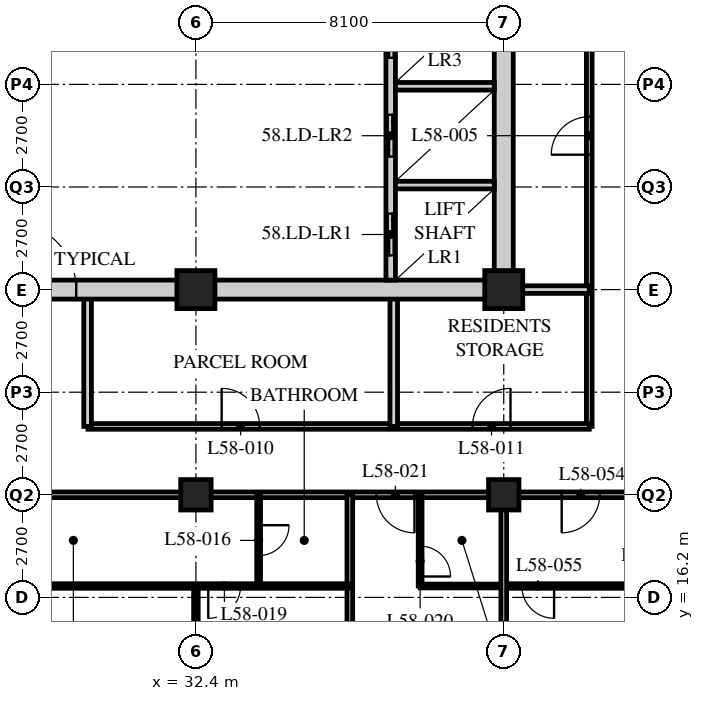
"""IFC4 building model, lengths in metres.
Left out: names, types, materials, properties, quantities, classifications, styles, units other than length and angle.
Written with IfcOpenShell. Run it as: python <this file> out.ifc"""

import sys

from ifc_helpers import new_model, si_unit, direction, frame, frame_2d, origin, origin_2d, place, context, subcontext, project, spatial, rectangle, hollow_rectangle, extrude, element, fill, save


model = new_model("IFC4")
c1 = context("Model", 3, precision=1e-05, world=origin(), true_north=direction((0.0, 1.0)))
c2 = subcontext(c1, "Body", "Model", "MODEL_VIEW")
j1 = project(units=[si_unit("LENGTHUNIT", "METRE"), si_unit("PLANEANGLEUNIT", "RADIAN")], contexts=[c1])
p1 = place(None, origin())
s1 = spatial("IfcSite", under=j1, at=p1, CompositionType="ELEMENT")
p2 = place(p1, origin())
s2 = spatial("IfcBuilding", under=s1, at=p2, CompositionType="ELEMENT")
p3 = place(p2, frame((0.0, 0.0, 224.4)))
s3 = spatial("IfcBuildingStorey", under=s2, at=p3, CompositionType="ELEMENT", Elevation=224.4)
p4 = place(p3, frame((32.4, 18.9, 0.0), z_axis=(0.0, 0.0, 1.0), x_axis=(1.0, 0.0, 0.0)))
e1 = element("IfcColumn", 1, at=p4, inside=s3, PredefinedType="COLUMN", context=c2, shape_type="SweptSolid", body=[
    extrude(hollow_rectangle(XDim=0.8, YDim=0.8, WallThickness=0.08, at=origin_2d()), origin(), (0.0, 0.0, 1.0), 3.6),
])
p5 = place(p3, frame((32.4, 24.3, 0.0), z_axis=(0.0, 0.0, 1.0), x_axis=(1.0, 0.0, 0.0)))
e2 = element("IfcColumn", 2, at=p5, inside=s3, PredefinedType="COLUMN", context=c2, shape_type="SweptSolid", body=[
    extrude(hollow_rectangle(XDim=1.0, YDim=1.0, WallThickness=0.1, at=origin_2d()), origin(), (0.0, 0.0, 1.0), 3.6),
])
p6 = place(p3, frame((40.5, 18.9, 0.0), z_axis=(0.0, 0.0, 1.0), x_axis=(1.0, 0.0, 0.0)))
e3 = element("IfcColumn", 3, at=p6, inside=s3, PredefinedType="COLUMN", context=c2, shape_type="SweptSolid", body=[
    extrude(hollow_rectangle(XDim=0.8, YDim=0.8, WallThickness=0.08, at=origin_2d()), origin(), (0.0, 0.0, 1.0), 3.6),
])
p7 = place(p3, frame((40.5, 24.3, 0.0), z_axis=(0.0, 0.0, 1.0), x_axis=(1.0, 0.0, 0.0)))
e4 = element("IfcColumn", 4, at=p7, inside=s3, PredefinedType="COLUMN", context=c2, shape_type="SweptSolid", body=[
    extrude(hollow_rectangle(XDim=1.0, YDim=1.0, WallThickness=0.1, at=origin_2d()), origin(), (0.0, 0.0, 1.0), 3.6),
])
p8 = place(p3, frame((8.1, 18.9, 0.0), z_axis=(0.0, 0.0, 1.0), x_axis=(1.0, 0.0, 0.0)))
e5 = element("IfcWall", 5, at=p8, inside=s3, PredefinedType="PARTITIONING", context=c2, shape_type="SweptSolid", body=[
    extrude(rectangle(XDim=36.45, YDim=0.15, at=frame_2d((18.225, 0.0))), origin(), (0.0, 0.0, 1.0), 2.628),
])
p9 = place(p8, frame((4.45, 0.0, 0.0)))
e6 = element("IfcOpeningElement", 6, at=p9, cuts=e5, PredefinedType="OPENING", context=c2, shape_type="SweptSolid", body=[
    extrude(rectangle(XDim=1.0, YDim=2.1, at=frame_2d((0.5, 1.05))), frame((0.0, 0.085, 0.0), z_axis=(0.0, -1.0, 0.0), x_axis=(1.0, 0.0, 0.0)), (0.0, 0.0, 1.0), 0.17),
])
p10 = place(p8, frame((17.1, 0.0, 0.0)))
e7 = element("IfcOpeningElement", 7, at=p10, cuts=e5, PredefinedType="OPENING", context=c2, shape_type="SweptSolid", body=[
    extrude(rectangle(XDim=1.0, YDim=2.1, at=frame_2d((0.5, 1.05))), frame((0.0, 0.085, 0.0), z_axis=(0.0, -1.0, 0.0), x_axis=(1.0, 0.0, 0.0)), (0.0, 0.0, 1.0), 0.17),
])
p11 = place(p8, frame((29.05, 0.0, 0.0)))
e8 = element("IfcOpeningElement", 8, at=p11, cuts=e5, PredefinedType="OPENING", context=c2, shape_type="SweptSolid", body=[
    extrude(rectangle(XDim=1.0, YDim=2.1, at=frame_2d((0.5, 1.05))), frame((0.0, 0.085, 0.0), z_axis=(0.0, -1.0, 0.0), x_axis=(1.0, 0.0, 0.0)), (0.0, 0.0, 1.0), 0.17),
])
p12 = place(p8, frame((2.625, 0.0, 0.0)))
e9 = element("IfcOpeningElement", 9, at=p12, cuts=e5, PredefinedType="OPENING", context=c2, shape_type="SweptSolid", body=[
    extrude(rectangle(XDim=1.0, YDim=2.1, at=frame_2d((0.5, 1.05))), frame((0.0, 0.085, 0.0), z_axis=(0.0, -1.0, 0.0), x_axis=(1.0, 0.0, 0.0)), (0.0, 0.0, 1.0), 0.17),
])
p13 = place(p8, frame((33.925, 0.0, 0.0)))
e10 = element("IfcOpeningElement", 10, at=p13, cuts=e5, PredefinedType="OPENING", context=c2, shape_type="SweptSolid", body=[
    extrude(rectangle(XDim=1.0, YDim=2.1, at=frame_2d((0.5, 1.05))), frame((0.0, 0.085, 0.0), z_axis=(0.0, -1.0, 0.0), x_axis=(1.0, 0.0, 0.0)), (0.0, 0.0, 1.0), 0.17),
])
p14 = place(p3, frame((42.75, 20.7, 0.0), z_axis=(0.0, 0.0, 1.0), x_axis=(0.0, 1.0, 0.0)))
e11 = element("IfcWall", 11, at=p14, inside=s3, PredefinedType="PARTITIONING", context=c2, shape_type="SweptSolid", body=[
    extrude(rectangle(XDim=19.8, YDim=0.15, at=frame_2d((9.9, 0.0))), origin(), (0.0, 0.0, 1.0), 3.39),
])
p15 = place(p14, frame((7.15, 0.0, 0.0)))
e12 = element("IfcOpeningElement", 12, at=p15, cuts=e11, PredefinedType="OPENING", context=c2, shape_type="SweptSolid", body=[
    extrude(rectangle(XDim=1.0, YDim=2.1, at=frame_2d((0.5, 1.05))), frame((0.0, 0.085, 0.0), z_axis=(0.0, -1.0, 0.0), x_axis=(1.0, 0.0, 0.0)), (0.0, 0.0, 1.0), 0.17),
])
p16 = place(p14, frame((15.25, 0.0, 0.0)))
e13 = element("IfcOpeningElement", 13, at=p16, cuts=e11, PredefinedType="OPENING", context=c2, shape_type="SweptSolid", body=[
    extrude(rectangle(XDim=1.0, YDim=2.1, at=frame_2d((0.5, 1.05))), frame((0.0, 0.085, 0.0), z_axis=(0.0, -1.0, 0.0), x_axis=(1.0, 0.0, 0.0)), (0.0, 0.0, 1.0), 0.17),
])
p17 = place(p3, frame((29.56, 20.7, 0.0), z_axis=(0.0, 0.0, 1.0), x_axis=(1.0, 0.0, 0.0)))
e14 = element("IfcWall", 14, at=p17, inside=s3, PredefinedType="PARTITIONING", context=c2, shape_type="SweptSolid", body=[
    extrude(rectangle(XDim=13.19, YDim=0.15, at=frame_2d((6.595, 0.0))), origin(), (0.0, 0.0, 1.0), 3.39),
])
p18 = place(p17, frame((3.518, 0.0, 0.0)))
e15 = element("IfcOpeningElement", 15, at=p18, cuts=e14, PredefinedType="OPENING", context=c2, shape_type="SweptSolid", body=[
    extrude(rectangle(XDim=1.0, YDim=2.1, at=frame_2d((0.5, 1.05))), frame((0.0, 0.085, 0.0), z_axis=(0.0, -1.0, 0.0), x_axis=(1.0, 0.0, 0.0)), (0.0, 0.0, 1.0), 0.17),
])
p19 = place(p17, frame((10.118, 0.0, 0.0)))
e16 = element("IfcOpeningElement", 16, at=p19, cuts=e14, PredefinedType="OPENING", context=c2, shape_type="SweptSolid", body=[
    extrude(rectangle(XDim=1.0, YDim=2.1, at=frame_2d((0.5, 1.05))), frame((0.0, 0.085, 0.0), z_axis=(0.0, -1.0, 0.0), x_axis=(1.0, 0.0, 0.0)), (0.0, 0.0, 1.0), 0.17),
])
for number, where, z_axis, x_axis in (
    (17, (37.606, 20.7, 0.0), (0.0, 0.0, 1.0), (0.0, 1.0, 0.0)),
    (18, (29.55, 20.7, 0.0), (0.0, 0.0, 1.0), (0.0, 1.0, 0.0)),
):
    element("IfcWall", number, at=place(p3, frame(where, z_axis=z_axis, x_axis=x_axis)), inside=s3, PredefinedType="SOLIDWALL", context=c2, shape_type="SweptSolid", body=[
        extrude(rectangle(XDim=3.6, YDim=0.2, at=frame_2d((1.8, 0.0))), origin(), (0.0, 0.0, 1.0), 3.39),
    ])
p20 = place(p3, frame((40.5, 24.3, 0.0), z_axis=(0.0, 0.0, 1.0), x_axis=(1.0, 0.0, 0.0)))
e19 = element("IfcWall", 19, at=p20, inside=s3, PredefinedType="SOLIDWALL", context=c2, shape_type="SweptSolid", body=[
    extrude(rectangle(XDim=2.25, YDim=0.2, at=frame_2d((1.125, 0.0))), origin(), (0.0, 0.0, 1.0), 3.39),
])
p21 = place(p3, frame((34.05, 18.9, 0.0), z_axis=(0.0, 0.0, 1.0), x_axis=(0.0, -1.0, 0.0)))
e20 = element("IfcWall", 20, at=p21, inside=s3, PredefinedType="PARTITIONING", context=c2, shape_type="SweptSolid", body=[
    extrude(rectangle(XDim=2.4, YDim=0.1, at=frame_2d((1.2, 0.0))), origin(), (0.0, 0.0, 1.0), 3.39),
])
p22 = place(p21, frame((0.8, 0.0, 0.0)))
e21 = element("IfcOpeningElement", 21, at=p22, cuts=e20, PredefinedType="OPENING", context=c2, shape_type="SweptSolid", body=[
    extrude(rectangle(XDim=0.8, YDim=2.1, at=frame_2d((0.4, 1.05))), frame((0.0, 0.06, 0.0), z_axis=(0.0, -1.0, 0.0), x_axis=(1.0, 0.0, 0.0)), (0.0, 0.0, 1.0), 0.12),
])
p23 = place(p3, frame((32.4, 16.5, 0.0), z_axis=(0.0, 0.0, 1.0), x_axis=(0.0, -1.0, 0.0)))
e22 = element("IfcWall", 22, at=p23, inside=s3, PredefinedType="PARTITIONING", context=c2, shape_type="SweptSolid", body=[
    extrude(rectangle(XDim=5.4, YDim=0.12, at=frame_2d((2.7, 0.0))), origin(), (0.0, 0.0, 1.0), 2.628),
])
p24 = place(p3, frame((36.45, 18.9, 0.0), z_axis=(0.0, 0.0, 1.0), x_axis=(0.0, -1.0, 0.0)))
e23 = element("IfcWall", 23, at=p24, inside=s3, PredefinedType="PARTITIONING", context=c2, shape_type="SweptSolid", body=[
    extrude(rectangle(XDim=7.8, YDim=0.15, at=frame_2d((3.9, 0.0))), origin(), (0.0, 0.0, 1.0), 3.39),
])
p25 = place(p3, frame((38.3, 16.5, 0.0), z_axis=(0.0, 0.0, 1.0), x_axis=(1.0, 0.0, 0.0)))
e24 = element("IfcWall", 24, at=p25, inside=s3, PredefinedType="PARTITIONING", context=c2, shape_type="SweptSolid", body=[
    extrude(rectangle(XDim=2.2, YDim=0.1, at=frame_2d((1.1, 0.0))), origin(), (0.0, 0.0, 1.0), 3.39),
])
p26 = place(p3, frame((38.3, 18.9, 0.0), z_axis=(0.0, 0.0, 1.0), x_axis=(0.0, -1.0, 0.0)))
e25 = element("IfcWall", 25, at=p26, inside=s3, PredefinedType="PARTITIONING", context=c2, shape_type="SweptSolid", body=[
    extrude(rectangle(XDim=2.4, YDim=0.1, at=frame_2d((1.2, 0.0))), origin(), (0.0, 0.0, 1.0), 3.39),
])
p27 = place(p26, frame((1.35, 0.0, 0.0)))
e26 = element("IfcOpeningElement", 26, at=p27, cuts=e25, PredefinedType="OPENING", context=c2, shape_type="SweptSolid", body=[
    extrude(rectangle(XDim=0.8, YDim=2.1, at=frame_2d((0.4, 1.05))), frame((0.0, 0.06, 0.0), z_axis=(0.0, -1.0, 0.0), x_axis=(1.0, 0.0, 0.0)), (0.0, 0.0, 1.0), 0.12),
])
p28 = place(p3, frame((8.1, 16.5, 0.0), z_axis=(0.0, 0.0, 1.0), x_axis=(1.0, 0.0, 0.0)))
e27 = element("IfcWall", 27, at=p28, inside=s3, PredefinedType="PARTITIONING", context=c2, shape_type="SweptSolid", body=[
    extrude(rectangle(XDim=28.35, YDim=0.12, at=frame_2d((14.175, 0.0))), origin(), (0.0, 0.0, 1.0), 3.39),
])
p29 = place(p28, frame((5.025, 0.0, 0.0)))
e28 = element("IfcOpeningElement", 28, at=p29, cuts=e27, PredefinedType="OPENING", context=c2, shape_type="SweptSolid", body=[
    extrude(rectangle(XDim=0.85, YDim=2.1, at=frame_2d((0.425, 1.05))), frame((0.0, 0.07, 0.0), z_axis=(0.0, -1.0, 0.0), x_axis=(1.0, 0.0, 0.0)), (0.0, 0.0, 1.0), 0.14),
])
p30 = place(p28, frame((12.475, 0.0, 0.0)))
e29 = element("IfcOpeningElement", 29, at=p30, cuts=e27, PredefinedType="OPENING", context=c2, shape_type="SweptSolid", body=[
    extrude(rectangle(XDim=0.85, YDim=2.1, at=frame_2d((0.425, 1.05))), frame((0.0, 0.07, 0.0), z_axis=(0.0, -1.0, 0.0), x_axis=(1.0, 0.0, 0.0)), (0.0, 0.0, 1.0), 0.14),
])
p31 = place(p28, frame((17.175, 0.0, 0.0)))
e30 = element("IfcOpeningElement", 30, at=p31, cuts=e27, PredefinedType="OPENING", context=c2, shape_type="SweptSolid", body=[
    extrude(rectangle(XDim=0.85, YDim=2.1, at=frame_2d((0.425, 1.05))), frame((0.0, 0.07, 0.0), z_axis=(0.0, -1.0, 0.0), x_axis=(1.0, 0.0, 0.0)), (0.0, 0.0, 1.0), 0.14),
])
p32 = place(p28, frame((24.625, 0.0, 0.0)))
e31 = element("IfcOpeningElement", 31, at=p32, cuts=e27, PredefinedType="OPENING", context=c2, shape_type="SweptSolid", body=[
    extrude(rectangle(XDim=0.85, YDim=2.1, at=frame_2d((0.425, 1.05))), frame((0.0, 0.07, 0.0), z_axis=(0.0, -1.0, 0.0), x_axis=(1.0, 0.0, 0.0)), (0.0, 0.0, 1.0), 0.14),
])
p33 = place(p28, frame((2.725, 0.0, 0.0)))
e32 = element("IfcOpeningElement", 32, at=p33, cuts=e27, PredefinedType="OPENING", context=c2, shape_type="SweptSolid", body=[
    extrude(rectangle(XDim=0.85, YDim=2.1, at=frame_2d((0.425, 1.05))), frame((0.0, 0.07, 0.0), z_axis=(0.0, -1.0, 0.0), x_axis=(1.0, 0.0, 0.0)), (0.0, 0.0, 1.0), 0.14),
])
p34 = place(p3, frame((40.5, 16.5, 0.0), z_axis=(0.0, 0.0, 1.0), x_axis=(1.0, 0.0, 0.0)))
e33 = element("IfcWall", 33, at=p34, inside=s3, PredefinedType="PARTITIONING", context=c2, shape_type="SweptSolid", body=[
    extrude(rectangle(XDim=8.05, YDim=0.12, at=frame_2d((4.025, 0.0))), origin(), (0.0, 0.0, 1.0), 3.39),
])
p35 = place(p34, frame((0.475, 0.0, 0.0)))
e34 = element("IfcOpeningElement", 34, at=p35, cuts=e33, PredefinedType="OPENING", context=c2, shape_type="SweptSolid", body=[
    extrude(rectangle(XDim=0.85, YDim=2.1, at=frame_2d((0.425, 1.05))), frame((0.0, 0.07, 0.0), z_axis=(0.0, -1.0, 0.0), x_axis=(1.0, 0.0, 0.0)), (0.0, 0.0, 1.0), 0.14),
])
p36 = place(p34, frame((4.325, 0.0, 0.0)))
e35 = element("IfcOpeningElement", 35, at=p36, cuts=e33, PredefinedType="OPENING", context=c2, shape_type="SweptSolid", body=[
    extrude(rectangle(XDim=0.85, YDim=2.1, at=frame_2d((0.425, 1.05))), frame((0.0, 0.07, 0.0), z_axis=(0.0, -1.0, 0.0), x_axis=(1.0, 0.0, 0.0)), (0.0, 0.0, 1.0), 0.14),
])
p37 = place(p3, frame((40.5, 18.9, 0.0), z_axis=(0.0, 0.0, 1.0), x_axis=(0.0, -1.0, 0.0)))
e36 = element("IfcWall", 36, at=p37, inside=s3, PredefinedType="PARTITIONING", context=c2, shape_type="SweptSolid", body=[
    extrude(rectangle(XDim=7.8, YDim=0.15, at=frame_2d((3.9, 0.0))), origin(), (0.0, 0.0, 1.0), 2.628),
])
p38 = place(p3, frame((15.95, 24.3, 0.0), z_axis=(0.0, 0.0, 1.0), x_axis=(1.0, 0.0, 0.0)))
e37 = element("IfcWall", 37, at=p38, inside=s3, PredefinedType="SOLIDWALL", context=c2, shape_type="SweptSolid", body=[
    extrude(rectangle(XDim=24.8, YDim=0.5, at=frame_2d((12.4, 0.0))), origin(), (0.0, 0.0, 1.0), 2.628),
])
p39 = place(p38, frame((11.5, 0.0, 0.0)))
e38 = element("IfcOpeningElement", 38, at=p39, cuts=e37, PredefinedType="OPENING", context=c2, shape_type="SweptSolid", body=[
    extrude(rectangle(XDim=1.8, YDim=2.4, at=frame_2d((0.9, 1.2))), frame((0.0, 0.26, 0.0), z_axis=(0.0, -1.0, 0.0), x_axis=(1.0, 0.0, 0.0)), (0.0, 0.0, 1.0), 0.52),
])
p40 = place(p3, frame((40.5, 24.55, 0.0), z_axis=(0.0, 0.0, 1.0), x_axis=(0.0, 1.0, 0.0)))
e39 = element("IfcWall", 39, at=p40, inside=s3, PredefinedType="SOLIDWALL", context=c2, shape_type="SweptSolid", body=[
    extrude(rectangle(XDim=15.7, YDim=0.5, at=frame_2d((7.85, 0.0))), origin(), (0.0, 0.0, 1.0), 2.628),
])
p41 = place(p3, frame((37.525, 24.55, 0.0), z_axis=(0.0, 0.0, 1.0), x_axis=(0.0, 1.0, 0.0)))
e40 = element("IfcWall", 40, at=p41, inside=s3, PredefinedType="SOLIDWALL", context=c2, shape_type="SweptSolid", body=[
    extrude(rectangle(XDim=7.75, YDim=0.25, at=frame_2d((3.875, 0.0))), origin(), (0.0, 0.0, 1.0), 3.39),
])
p42 = place(p41, frame((0.65, 0.0, 0.0)))
e41 = element("IfcOpeningElement", 41, at=p42, cuts=e40, PredefinedType="OPENING", context=c2, shape_type="SweptSolid", body=[
    extrude(rectangle(XDim=1.1, YDim=2.4, at=frame_2d((0.55, 1.2))), frame((0.0, 0.135, 0.0), z_axis=(0.0, -1.0, 0.0), x_axis=(1.0, 0.0, 0.0)), (0.0, 0.0, 1.0), 0.27),
])
p43 = place(p41, frame((3.25, 0.0, 0.0)))
e42 = element("IfcOpeningElement", 42, at=p43, cuts=e40, PredefinedType="OPENING", context=c2, shape_type="SweptSolid", body=[
    extrude(rectangle(XDim=1.1, YDim=2.4, at=frame_2d((0.55, 1.2))), frame((0.0, 0.135, 0.0), z_axis=(0.0, -1.0, 0.0), x_axis=(1.0, 0.0, 0.0)), (0.0, 0.0, 1.0), 0.27),
])
p44 = place(p41, frame((5.85, 0.0, 0.0)))
e43 = element("IfcOpeningElement", 43, at=p44, cuts=e40, PredefinedType="OPENING", context=c2, shape_type="SweptSolid", body=[
    extrude(rectangle(XDim=1.1, YDim=2.4, at=frame_2d((0.55, 1.2))), frame((0.0, 0.135, 0.0), z_axis=(0.0, -1.0, 0.0), x_axis=(1.0, 0.0, 0.0)), (0.0, 0.0, 1.0), 0.27),
])
for number, where, z_axis, x_axis in (
    (44, (37.65, 27.05, 0.0), (0.0, 0.0, 1.0), (1.0, 0.0, 0.0)),
    (45, (37.65, 29.65, 0.0), (0.0, 0.0, 1.0), (1.0, 0.0, 0.0)),
):
    element("IfcWall", number, at=place(p3, frame(where, z_axis=z_axis, x_axis=x_axis)), inside=s3, PredefinedType="SOLIDWALL", context=c2, shape_type="SweptSolid", body=[
        extrude(rectangle(XDim=2.6, YDim=0.2, at=frame_2d((1.3, 0.0))), origin(), (0.0, 0.0, 1.0), 3.39),
    ])
p45 = place(p15, origin())
e46 = element("IfcDoor", 46, at=p45, inside=s3, OperationType="SINGLE_SWING_LEFT", PredefinedType="DOOR", context=c2, shape_type="SweptSolid", body=[
    extrude(rectangle(XDim=1.0, YDim=2.1, at=frame_2d((0.5, 1.05))), frame((0.0, 0.025, 0.0), z_axis=(0.0, -1.0, 0.0), x_axis=(1.0, 0.0, 0.0)), (0.0, 0.0, 1.0), 0.05),
])
fill(e12, e46)
p46 = place(p18, origin())
e47 = element("IfcDoor", 47, at=p46, inside=s3, OperationType="SINGLE_SWING_LEFT", PredefinedType="DOOR", context=c2, shape_type="SweptSolid", body=[
    extrude(rectangle(XDim=1.0, YDim=2.1, at=frame_2d((0.5, 1.05))), frame((0.0, 0.025, 0.0), z_axis=(0.0, -1.0, 0.0), x_axis=(1.0, 0.0, 0.0)), (0.0, 0.0, 1.0), 0.05),
])
fill(e15, e47)
p47 = place(p19, origin())
e48 = element("IfcDoor", 48, at=p47, inside=s3, OperationType="SINGLE_SWING_RIGHT", PredefinedType="DOOR", context=c2, shape_type="SweptSolid", body=[
    extrude(rectangle(XDim=1.0, YDim=2.1, at=frame_2d((0.5, 1.05))), frame((0.0, 0.025, 0.0), z_axis=(0.0, -1.0, 0.0), x_axis=(1.0, 0.0, 0.0)), (0.0, 0.0, 1.0), 0.05),
])
fill(e16, e48)
p48 = place(p22, origin())
e49 = element("IfcDoor", 49, at=p48, inside=s3, OperationType="SINGLE_SWING_LEFT", PredefinedType="DOOR", context=c2, shape_type="SweptSolid", body=[
    extrude(rectangle(XDim=0.8, YDim=2.1, at=frame_2d((0.4, 1.05))), frame((0.0, 0.025, 0.0), z_axis=(0.0, -1.0, 0.0), x_axis=(1.0, 0.0, 0.0)), (0.0, 0.0, 1.0), 0.05),
])
fill(e21, e49)
p49 = place(p32, origin())
e50 = element("IfcDoor", 50, at=p49, inside=s3, OperationType="SINGLE_SWING_RIGHT", PredefinedType="DOOR", context=c2, shape_type="SweptSolid", body=[
    extrude(rectangle(XDim=0.85, YDim=2.1, at=frame_2d((0.425, 1.05))), frame((0.0, 0.025, 0.0), z_axis=(0.0, -1.0, 0.0), x_axis=(1.0, 0.0, 0.0)), (0.0, 0.0, 1.0), 0.05),
])
fill(e31, e50)
p50 = place(p27, origin())
e51 = element("IfcDoor", 51, at=p50, inside=s3, OperationType="SINGLE_SWING_RIGHT", PredefinedType="DOOR", context=c2, shape_type="SweptSolid", body=[
    extrude(rectangle(XDim=0.8, YDim=2.1, at=frame_2d((0.4, 1.05))), frame((0.0, 0.025, 0.0), z_axis=(0.0, -1.0, 0.0), x_axis=(1.0, 0.0, 0.0)), (0.0, 0.0, 1.0), 0.05),
])
fill(e26, e51)
p51 = place(p11, origin())
e52 = element("IfcDoor", 52, at=p51, inside=s3, OperationType="SINGLE_SWING_LEFT", PredefinedType="DOOR", context=c2, shape_type="SweptSolid", body=[
    extrude(rectangle(XDim=1.0, YDim=2.1, at=frame_2d((0.5, 1.05))), frame((0.0, 0.025, 0.0), z_axis=(0.0, -1.0, 0.0), x_axis=(1.0, 0.0, 0.0)), (0.0, 0.0, 1.0), 0.05),
])
fill(e8, e52)
p52 = place(p13, origin())
e53 = element("IfcDoor", 53, at=p52, inside=s3, OperationType="SINGLE_SWING_RIGHT", PredefinedType="DOOR", context=c2, shape_type="SweptSolid", body=[
    extrude(rectangle(XDim=1.0, YDim=2.1, at=frame_2d((0.5, 1.05))), frame((0.0, 0.025, 0.0), z_axis=(0.0, -1.0, 0.0), x_axis=(1.0, 0.0, 0.0)), (0.0, 0.0, 1.0), 0.05),
])
fill(e10, e53)
p53 = place(p35, origin())
e54 = element("IfcDoor", 54, at=p53, inside=s3, OperationType="SINGLE_SWING_LEFT", PredefinedType="DOOR", context=c2, shape_type="SweptSolid", body=[
    extrude(rectangle(XDim=0.85, YDim=2.1, at=frame_2d((0.425, 1.05))), frame((0.0, 0.025, 0.0), z_axis=(0.0, -1.0, 0.0), x_axis=(1.0, 0.0, 0.0)), (0.0, 0.0, 1.0), 0.05),
])
fill(e34, e54)
p54 = place(p42, origin())
e55 = element("IfcDoor", 55, at=p54, inside=s3, OperationType="DOUBLE_DOOR_SLIDING", PredefinedType="DOOR", context=c2, shape_type="SweptSolid", body=[
    extrude(rectangle(XDim=1.1, YDim=2.4, at=frame_2d((0.55, 1.2))), frame((0.0, 0.025, 0.0), z_axis=(0.0, -1.0, 0.0), x_axis=(1.0, 0.0, 0.0)), (0.0, 0.0, 1.0), 0.05),
])
fill(e41, e55)
p55 = place(p43, origin())
e56 = element("IfcDoor", 56, at=p55, inside=s3, OperationType="DOUBLE_DOOR_SLIDING", PredefinedType="DOOR", context=c2, shape_type="SweptSolid", body=[
    extrude(rectangle(XDim=1.1, YDim=2.4, at=frame_2d((0.55, 1.2))), frame((0.0, 0.025, 0.0), z_axis=(0.0, -1.0, 0.0), x_axis=(1.0, 0.0, 0.0)), (0.0, 0.0, 1.0), 0.05),
])
fill(e42, e56)
p56 = place(p44, origin())
e57 = element("IfcDoor", 57, at=p56, inside=s3, OperationType="DOUBLE_DOOR_SLIDING", PredefinedType="DOOR", context=c2, shape_type="SweptSolid", body=[
    extrude(rectangle(XDim=1.1, YDim=2.4, at=frame_2d((0.55, 1.2))), frame((0.0, 0.025, 0.0), z_axis=(0.0, -1.0, 0.0), x_axis=(1.0, 0.0, 0.0)), (0.0, 0.0, 1.0), 0.05),
])
fill(e43, e57)
p57 = place(p39, origin())
e58 = element("IfcDoor", 58, at=p57, inside=s3, OperationType="DOUBLE_DOOR_SINGLE_SWING", PredefinedType="DOOR", context=c2, shape_type="SweptSolid", body=[
    extrude(rectangle(XDim=1.8, YDim=2.4, at=frame_2d((0.9, 1.2))), frame((0.0, 0.025, 0.0), z_axis=(0.0, -1.0, 0.0), x_axis=(1.0, 0.0, 0.0)), (0.0, 0.0, 1.0), 0.05),
])
fill(e38, e58)
save(model, sys.argv[1])
